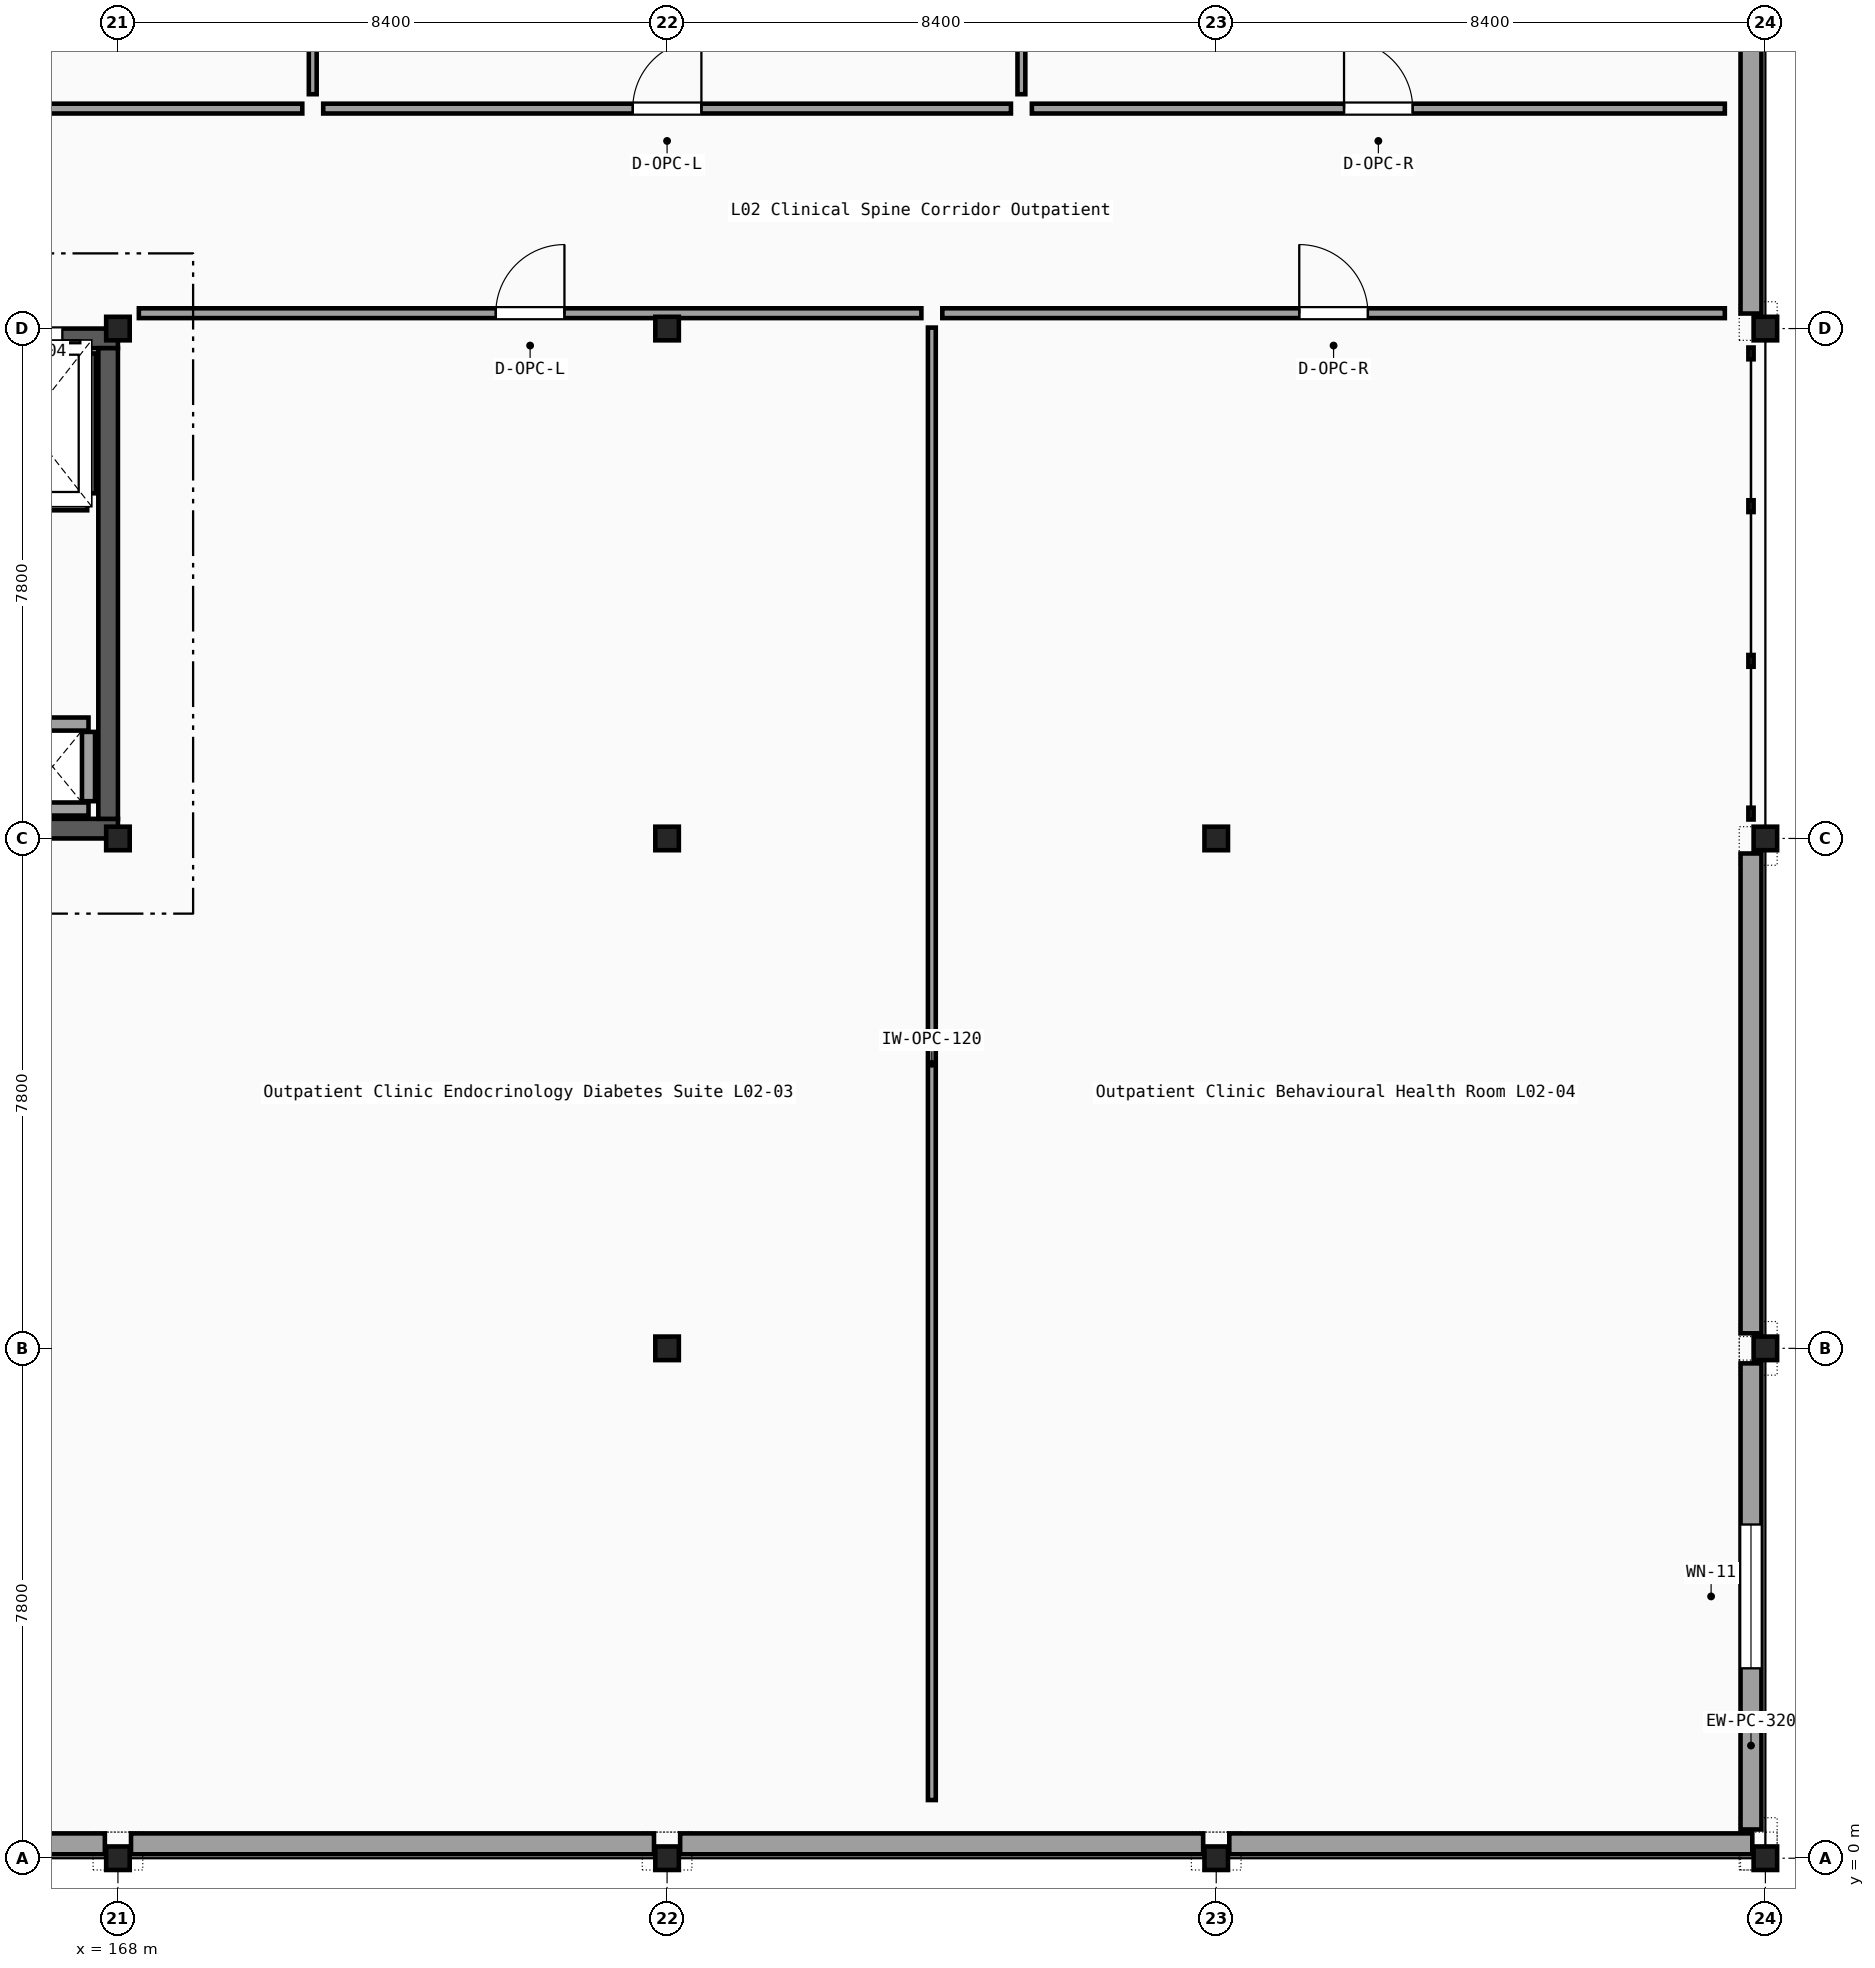
"""IFC4 building model, lengths in metres.
Left out: names, types, materials, properties, quantities, classifications, styles, units other than length and angle.
Written with IfcOpenShell. Run it as: python <this file> out.ifc"""

import sys

from ifc_helpers import new_model, si_unit, direction, frame, frame_2d, origin, origin_2d, place, context, subcontext, project, spatial, rectangle, i_section, extrude, element, fill, save


model = new_model("IFC4")
c1 = context("Model", 3, precision=1e-05, world=origin(), true_north=direction((0.0, 1.0)))
c2 = subcontext(c1, "Body", "Model", "MODEL_VIEW")
j1 = project(units=[si_unit("LENGTHUNIT", "METRE"), si_unit("PLANEANGLEUNIT", "RADIAN")], contexts=[c1])
p1 = place(None, origin())
s1 = spatial("IfcSite", under=j1, at=p1, CompositionType="ELEMENT")
p2 = place(p1, origin())
s2 = spatial("IfcBuilding", under=s1, at=p2, CompositionType="ELEMENT")
p3 = place(p2, frame((0.0, 0.0, 10.2)))
s3 = spatial("IfcBuildingStorey", under=s2, at=p3, CompositionType="ELEMENT", Elevation=10.2)
for number, where, z_axis, x_axis in (
    (1, (168.0, 0.0, 0.0), (0.0, 0.0, 1.0), (1.0, 0.0, 0.0)),
    (2, (168.0, 15.6, 0.0), (0.0, 0.0, 1.0), (1.0, 0.0, 0.0)),
    (3, (168.0, 23.4, 0.0), (0.0, 0.0, 1.0), (1.0, 0.0, 0.0)),
    (4, (176.4, 0.0, 0.0), (0.0, 0.0, 1.0), (1.0, 0.0, 0.0)),
    (5, (176.4, 7.8, 0.0), (0.0, 0.0, 1.0), (1.0, 0.0, 0.0)),
    (6, (176.4, 15.6, 0.0), (0.0, 0.0, 1.0), (1.0, 0.0, 0.0)),
    (7, (176.4, 23.4, 0.0), (0.0, 0.0, 1.0), (1.0, 0.0, 0.0)),
    (8, (184.8, 0.0, 0.0), (0.0, 0.0, 1.0), (1.0, 0.0, 0.0)),
    (9, (184.8, 15.6, 0.0), (0.0, 0.0, 1.0), (1.0, 0.0, 0.0)),
    (10, (193.2, 0.0, 0.0), (0.0, 0.0, 1.0), (1.0, 0.0, 0.0)),
    (11, (193.2, 7.8, 0.0), (0.0, 0.0, 1.0), (1.0, 0.0, 0.0)),
    (12, (193.2, 15.6, 0.0), (0.0, 0.0, 1.0), (1.0, 0.0, 0.0)),
    (13, (193.2, 23.4, 0.0), (0.0, 0.0, 1.0), (1.0, 0.0, 0.0)),
):
    element("IfcColumn", number, at=place(p3, frame(where, z_axis=z_axis, x_axis=x_axis)), inside=s3, PredefinedType="COLUMN", context=c2, shape_type="SweptSolid", body=[
        extrude(i_section(OverallWidth=0.3, OverallDepth=0.36, WebThickness=0.012, FlangeThickness=0.022, FilletRadius=0.027, at=origin_2d()), origin(), (0.0, 0.0, 1.0), 4.65),
    ])
p4 = place(p3, frame((159.8, 0.22, 0.0), z_axis=(0.0, 0.0, 1.0), x_axis=(1.0, 0.0, 0.0)))
e14 = element("IfcWall", 14, at=p4, inside=s3, PredefinedType="SOLIDWALL", context=c2, shape_type="SweptSolid", body=[
    extrude(rectangle(XDim=8.0, YDim=0.32, at=frame_2d((4.0, 0.0))), origin(), (0.0, 0.0, 1.0), 4.0),
])
p5 = place(p4, frame((3.3, 0.0, 0.95)))
e15 = element("IfcOpeningElement", 15, at=p5, cuts=e14, PredefinedType="OPENING", context=c2, shape_type="SweptSolid", body=[
    extrude(rectangle(XDim=1.4, YDim=1.55, at=frame_2d((0.7, 0.775))), frame((0.0, 0.17, 0.0), z_axis=(0.0, -1.0, 0.0), x_axis=(1.0, 0.0, 0.0)), (0.0, 0.0, 1.0), 0.34),
])
for number, where, z_axis, x_axis in (
    (16, (168.2, 0.22, 0.0), (0.0, 0.0, 1.0), (1.0, 0.0, 0.0)),
    (17, (176.6, 0.22, 0.0), (0.0, 0.0, 1.0), (1.0, 0.0, 0.0)),
    (18, (185.0, 0.22, 0.0), (0.0, 0.0, 1.0), (1.0, 0.0, 0.0)),
):
    element("IfcWall", number, at=place(p3, frame(where, z_axis=z_axis, x_axis=x_axis)), inside=s3, PredefinedType="SOLIDWALL", context=c2, shape_type="SweptSolid", body=[
        extrude(rectangle(XDim=8.0, YDim=0.32, at=frame_2d((4.0, 0.0))), origin(), (0.0, 0.0, 1.0), 4.0),
    ])
p6 = place(p3, frame((192.98, 0.44, 0.0), z_axis=(0.0, 0.0, 1.0), x_axis=(0.0, 1.0, 0.0)))
e19 = element("IfcWall", 19, at=p6, inside=s3, PredefinedType="SOLIDWALL", context=c2, shape_type="SweptSolid", body=[
    extrude(rectangle(XDim=7.13, YDim=0.32, at=frame_2d((3.565, 0.0))), origin(), (0.0, 0.0, 1.0), 3.9),
])
p7 = place(p6, frame((2.465, 0.0, 1.35)))
e20 = element("IfcOpeningElement", 20, at=p7, cuts=e19, PredefinedType="OPENING", context=c2, shape_type="SweptSolid", body=[
    extrude(rectangle(XDim=2.2, YDim=1.15, at=frame_2d((1.1, 0.575))), frame((0.0, 0.17, 0.0), z_axis=(0.0, -1.0, 0.0), x_axis=(1.0, 0.0, 0.0)), (0.0, 0.0, 1.0), 0.34),
])
p8 = place(p3, frame((192.98, 8.03, 0.0), z_axis=(0.0, 0.0, 1.0), x_axis=(0.0, 1.0, 0.0)))
e21 = element("IfcWall", 21, at=p8, inside=s3, PredefinedType="SOLIDWALL", context=c2, shape_type="SweptSolid", body=[
    extrude(rectangle(XDim=7.34, YDim=0.32, at=frame_2d((3.67, 0.0))), origin(), (0.0, 0.0, 1.0), 3.9),
])
p9 = place(p3, frame((192.98, 23.63, 0.0), z_axis=(0.0, 0.0, 1.0), x_axis=(0.0, 1.0, 0.0)))
e22 = element("IfcWall", 22, at=p9, inside=s3, PredefinedType="SOLIDWALL", context=c2, shape_type="SweptSolid", body=[
    extrude(rectangle(XDim=7.34, YDim=0.32, at=frame_2d((3.67, 0.0))), origin(), (0.0, 0.0, 1.0), 3.8),
])
p10 = place(p3, frame((159.6, 15.75, 0.0), z_axis=(0.0, 0.0, 1.0), x_axis=(1.0, 0.0, 0.0)))
e23 = element("IfcWall", 23, at=p10, inside=s3, PredefinedType="SHEAR", context=c2, shape_type="SweptSolid", body=[
    extrude(rectangle(XDim=8.4, YDim=0.3, at=frame_2d((4.2, 0.0))), origin(), (0.0, 0.0, 1.0), 4.42),
])
p11 = place(p3, frame((159.6, 23.25, 0.0), z_axis=(0.0, 0.0, 1.0), x_axis=(1.0, 0.0, 0.0)))
e24 = element("IfcWall", 24, at=p11, inside=s3, PredefinedType="SHEAR", context=c2, shape_type="SweptSolid", body=[
    extrude(rectangle(XDim=8.4, YDim=0.3, at=frame_2d((4.2, 0.0))), origin(), (0.0, 0.0, 1.0), 4.42),
])
p12 = place(p11, frame((1.38, 0.0, 0.0)))
e25 = element("IfcOpeningElement", 25, at=p12, cuts=e24, PredefinedType="OPENING", context=c2, shape_type="SweptSolid", body=[
    extrude(rectangle(XDim=1.2, YDim=2.15, at=frame_2d((0.6, 1.075))), frame((0.0, 0.16, 0.0), z_axis=(0.0, -1.0, 0.0), x_axis=(1.0, 0.0, 0.0)), (0.0, 0.0, 1.0), 0.32),
])
p13 = place(p11, frame((4.43, 0.0, 0.0)))
e26 = element("IfcOpeningElement", 26, at=p13, cuts=e24, PredefinedType="OPENING", context=c2, shape_type="SweptSolid", body=[
    extrude(rectangle(XDim=1.1, YDim=2.15, at=frame_2d((0.55, 1.075))), frame((0.0, 0.16, 0.0), z_axis=(0.0, -1.0, 0.0), x_axis=(1.0, 0.0, 0.0)), (0.0, 0.0, 1.0), 0.32),
])
p14 = place(p11, frame((6.45, 0.0, 0.0)))
e27 = element("IfcOpeningElement", 27, at=p14, cuts=e24, PredefinedType="OPENING", context=c2, shape_type="SweptSolid", body=[
    extrude(rectangle(XDim=1.1, YDim=2.15, at=frame_2d((0.55, 1.075))), frame((0.0, 0.16, 0.0), z_axis=(0.0, -1.0, 0.0), x_axis=(1.0, 0.0, 0.0)), (0.0, 0.0, 1.0), 0.32),
])
p15 = place(p3, frame((167.85, 15.9, 0.0), z_axis=(0.0, 0.0, 1.0), x_axis=(0.0, 1.0, 0.0)))
e28 = element("IfcWall", 28, at=p15, inside=s3, PredefinedType="SHEAR", context=c2, shape_type="SweptSolid", body=[
    extrude(rectangle(XDim=7.2, YDim=0.3, at=frame_2d((3.6, 0.0))), origin(), (0.0, 0.0, 1.0), 4.42),
])
for number, where, z_axis, x_axis in (
    (29, (166.45, 16.05, 0.0), (0.0, 0.0, 1.0), (1.0, 0.0, 0.0)),
    (30, (166.45, 17.35, 0.0), (0.0, 0.0, 1.0), (1.0, 0.0, 0.0)),
):
    element("IfcWall", number, at=place(p3, frame(where, z_axis=z_axis, x_axis=x_axis)), inside=s3, PredefinedType="PARTITIONING", context=c2, shape_type="SweptSolid", body=[
        extrude(rectangle(XDim=1.1, YDim=0.2, at=frame_2d((0.55, 0.0))), origin(), (0.0, 0.0, 1.0), 3.9),
    ])
p16 = place(p3, frame((167.55, 16.17, 0.0), z_axis=(0.0, 0.0, 1.0), x_axis=(0.0, 1.0, 0.0)))
e31 = element("IfcWall", 31, at=p16, inside=s3, PredefinedType="PARTITIONING", context=c2, shape_type="SweptSolid", body=[
    extrude(rectangle(XDim=1.06, YDim=0.2, at=frame_2d((0.53, 0.0))), origin(), (0.0, 0.0, 1.0), 3.9),
])
p17 = place(p3, frame((167.56, 20.88, 0.0), z_axis=(0.0, 0.0, 1.0), x_axis=(0.0, 1.0, 0.0)))
e32 = element("IfcWall", 32, at=p17, inside=s3, PredefinedType="PARTITIONING", context=c2, shape_type="SweptSolid", body=[
    extrude(rectangle(XDim=2.14, YDim=0.2, at=frame_2d((1.07, 0.0))), origin(), (0.0, 0.0, 1.0), 3.9),
])
p18 = place(p3, frame((165.67, 20.72, 0.0), z_axis=(0.0, 0.0, 1.0), x_axis=(1.0, 0.0, 0.0)))
e33 = element("IfcWall", 33, at=p18, inside=s3, PredefinedType="PARTITIONING", context=c2, shape_type="SweptSolid", body=[
    extrude(rectangle(XDim=1.86, YDim=0.2, at=frame_2d((0.93, 0.0))), origin(), (0.0, 0.0, 1.0), 3.9),
])
p19 = place(p3, frame((168.32, 23.635, 0.0), z_axis=(0.0, 0.0, 1.0), x_axis=(1.0, 0.0, 0.0)))
e34 = element("IfcWall", 34, at=p19, inside=s3, PredefinedType="PARTITIONING", context=c2, shape_type="SweptSolid", body=[
    extrude(rectangle(XDim=11.97, YDim=0.15, at=frame_2d((5.985, 0.0))), origin(), (0.0, 0.0, 1.0), 3.8),
])
p20 = place(p19, frame((5.46, 0.0, 0.0)))
e35 = element("IfcOpeningElement", 35, at=p20, cuts=e34, PredefinedType="OPENING", context=c2, shape_type="SweptSolid", body=[
    extrude(rectangle(XDim=1.05, YDim=2.15, at=frame_2d((0.525, 1.075))), frame((0.0, 0.085, 0.0), z_axis=(0.0, -1.0, 0.0), x_axis=(1.0, 0.0, 0.0)), (0.0, 0.0, 1.0), 0.17),
])
p21 = place(p3, frame((180.45, 0.89, 0.0), z_axis=(0.0, 0.0, 1.0), x_axis=(0.0, 1.0, 0.0)))
e36 = element("IfcWall", 36, at=p21, inside=s3, PredefinedType="PARTITIONING", context=c2, shape_type="SweptSolid", body=[
    extrude(rectangle(XDim=22.525, YDim=0.12, at=frame_2d((11.263, 0.0))), origin(), (0.0, 0.0, 1.0), 3.8),
])
p22 = place(p3, frame((180.61, 23.635, 0.0), z_axis=(0.0, 0.0, 1.0), x_axis=(1.0, 0.0, 0.0)))
e37 = element("IfcWall", 37, at=p22, inside=s3, PredefinedType="PARTITIONING", context=c2, shape_type="SweptSolid", body=[
    extrude(rectangle(XDim=11.97, YDim=0.15, at=frame_2d((5.985, 0.0))), origin(), (0.0, 0.0, 1.0), 3.8),
])
p23 = place(p22, frame((5.46, 0.0, 0.0)))
e38 = element("IfcOpeningElement", 38, at=p23, cuts=e37, PredefinedType="OPENING", context=c2, shape_type="SweptSolid", body=[
    extrude(rectangle(XDim=1.05, YDim=2.15, at=frame_2d((0.525, 1.075))), frame((0.0, 0.085, 0.0), z_axis=(0.0, -1.0, 0.0), x_axis=(1.0, 0.0, 0.0)), (0.0, 0.0, 1.0), 0.17),
])
p24 = place(p3, frame((160.22, 26.765, 0.0), z_axis=(0.0, 0.0, 1.0), x_axis=(1.0, 0.0, 0.0)))
e39 = element("IfcWall", 39, at=p24, inside=s3, PredefinedType="PARTITIONING", context=c2, shape_type="SweptSolid", body=[
    extrude(rectangle(XDim=10.6, YDim=0.15, at=frame_2d((5.3, 0.0))), origin(), (0.0, 0.0, 1.0), 4.0),
])
p25 = place(p24, frame((4.775, 0.0, 0.0)))
e40 = element("IfcOpeningElement", 40, at=p25, cuts=e39, PredefinedType="OPENING", context=c2, shape_type="SweptSolid", body=[
    extrude(rectangle(XDim=1.05, YDim=2.15, at=frame_2d((0.525, 1.075))), frame((0.0, 0.085, 0.0), z_axis=(0.0, -1.0, 0.0), x_axis=(1.0, 0.0, 0.0)), (0.0, 0.0, 1.0), 0.17),
])
p26 = place(p3, frame((170.98, 26.985, 0.0), z_axis=(0.0, 0.0, 1.0), x_axis=(0.0, 1.0, 0.0)))
e41 = element("IfcWall", 41, at=p26, inside=s3, PredefinedType="PARTITIONING", context=c2, shape_type="SweptSolid", body=[
    extrude(rectangle(XDim=11.325, YDim=0.12, at=frame_2d((5.663, 0.0))), origin(), (0.0, 0.0, 1.0), 3.9),
])
p27 = place(p3, frame((171.14, 26.765, 0.0), z_axis=(0.0, 0.0, 1.0), x_axis=(1.0, 0.0, 0.0)))
e42 = element("IfcWall", 42, at=p27, inside=s3, PredefinedType="PARTITIONING", context=c2, shape_type="SweptSolid", body=[
    extrude(rectangle(XDim=10.52, YDim=0.15, at=frame_2d((5.26, 0.0))), origin(), (0.0, 0.0, 1.0), 4.0),
])
p28 = place(p27, frame((4.735, 0.0, 0.0)))
e43 = element("IfcOpeningElement", 43, at=p28, cuts=e42, PredefinedType="OPENING", context=c2, shape_type="SweptSolid", body=[
    extrude(rectangle(XDim=1.05, YDim=2.15, at=frame_2d((0.525, 1.075))), frame((0.0, 0.085, 0.0), z_axis=(0.0, -1.0, 0.0), x_axis=(1.0, 0.0, 0.0)), (0.0, 0.0, 1.0), 0.17),
])
p29 = place(p3, frame((181.82, 26.985, 0.0), z_axis=(0.0, 0.0, 1.0), x_axis=(0.0, 1.0, 0.0)))
e44 = element("IfcWall", 44, at=p29, inside=s3, PredefinedType="PARTITIONING", context=c2, shape_type="SweptSolid", body=[
    extrude(rectangle(XDim=11.325, YDim=0.12, at=frame_2d((5.663, 0.0))), origin(), (0.0, 0.0, 1.0), 3.8),
])
p30 = place(p3, frame((181.98, 26.765, 0.0), z_axis=(0.0, 0.0, 1.0), x_axis=(1.0, 0.0, 0.0)))
e45 = element("IfcWall", 45, at=p30, inside=s3, PredefinedType="PARTITIONING", context=c2, shape_type="SweptSolid", body=[
    extrude(rectangle(XDim=10.6, YDim=0.15, at=frame_2d((5.3, 0.0))), origin(), (0.0, 0.0, 1.0), 4.37),
])
p31 = place(p30, frame((4.775, 0.0, 0.0)))
e46 = element("IfcOpeningElement", 46, at=p31, cuts=e45, PredefinedType="OPENING", context=c2, shape_type="SweptSolid", body=[
    extrude(rectangle(XDim=1.05, YDim=2.15, at=frame_2d((0.525, 1.075))), frame((0.0, 0.085, 0.0), z_axis=(0.0, -1.0, 0.0), x_axis=(1.0, 0.0, 0.0)), (0.0, 0.0, 1.0), 0.17),
])
p32 = place(p7, origin())
e47 = element("IfcWindow", 47, at=p32, inside=s3, PartitioningType="SINGLE_PANEL", PredefinedType="WINDOW", context=c2, shape_type="SweptSolid", body=[
    extrude(rectangle(XDim=2.2, YDim=1.15, at=frame_2d((1.1, 0.575))), frame((0.0, 0.03, 0.0), z_axis=(0.0, -1.0, 0.0), x_axis=(1.0, 0.0, 0.0)), (0.0, 0.0, 1.0), 0.06),
])
fill(e20, e47)
p33 = place(p14, origin())
e48 = element("IfcDoor", 48, at=p33, inside=s3, OperationType="DOUBLE_DOOR_SLIDING", PredefinedType="DOOR", context=c2, shape_type="SweptSolid", body=[
    extrude(rectangle(XDim=1.1, YDim=2.15, at=frame_2d((0.55, 1.075))), frame((0.0, 0.025, 0.0), z_axis=(0.0, -1.0, 0.0), x_axis=(1.0, 0.0, 0.0)), (0.0, 0.0, 1.0), 0.05),
])
fill(e27, e48)
p34 = place(p20, origin())
e49 = element("IfcDoor", 49, at=p34, inside=s3, OperationType="SINGLE_SWING_RIGHT", PredefinedType="DOOR", context=c2, shape_type="SweptSolid", body=[
    extrude(rectangle(XDim=1.05, YDim=2.15, at=frame_2d((0.525, 1.075))), frame((0.0, 0.025, 0.0), z_axis=(0.0, -1.0, 0.0), x_axis=(1.0, 0.0, 0.0)), (0.0, 0.0, 1.0), 0.05),
])
fill(e35, e49)
p35 = place(p23, origin())
e50 = element("IfcDoor", 50, at=p35, inside=s3, OperationType="SINGLE_SWING_LEFT", PredefinedType="DOOR", context=c2, shape_type="SweptSolid", body=[
    extrude(rectangle(XDim=1.05, YDim=2.15, at=frame_2d((0.525, 1.075))), frame((0.0, 0.025, 0.0), z_axis=(0.0, -1.0, 0.0), x_axis=(1.0, 0.0, 0.0)), (0.0, 0.0, 1.0), 0.05),
])
fill(e38, e50)
p36 = place(p28, origin())
e51 = element("IfcDoor", 51, at=p36, inside=s3, OperationType="SINGLE_SWING_RIGHT", PredefinedType="DOOR", context=c2, shape_type="SweptSolid", body=[
    extrude(rectangle(XDim=1.05, YDim=2.15, at=frame_2d((0.525, 1.075))), frame((0.0, 0.025, 0.0), z_axis=(0.0, -1.0, 0.0), x_axis=(1.0, 0.0, 0.0)), (0.0, 0.0, 1.0), 0.05),
])
fill(e43, e51)
p37 = place(p31, origin())
e52 = element("IfcDoor", 52, at=p37, inside=s3, OperationType="SINGLE_SWING_LEFT", PredefinedType="DOOR", context=c2, shape_type="SweptSolid", body=[
    extrude(rectangle(XDim=1.05, YDim=2.15, at=frame_2d((0.525, 1.075))), frame((0.0, 0.025, 0.0), z_axis=(0.0, -1.0, 0.0), x_axis=(1.0, 0.0, 0.0)), (0.0, 0.0, 1.0), 0.05),
])
fill(e46, e52)
save(model, sys.argv[1])
